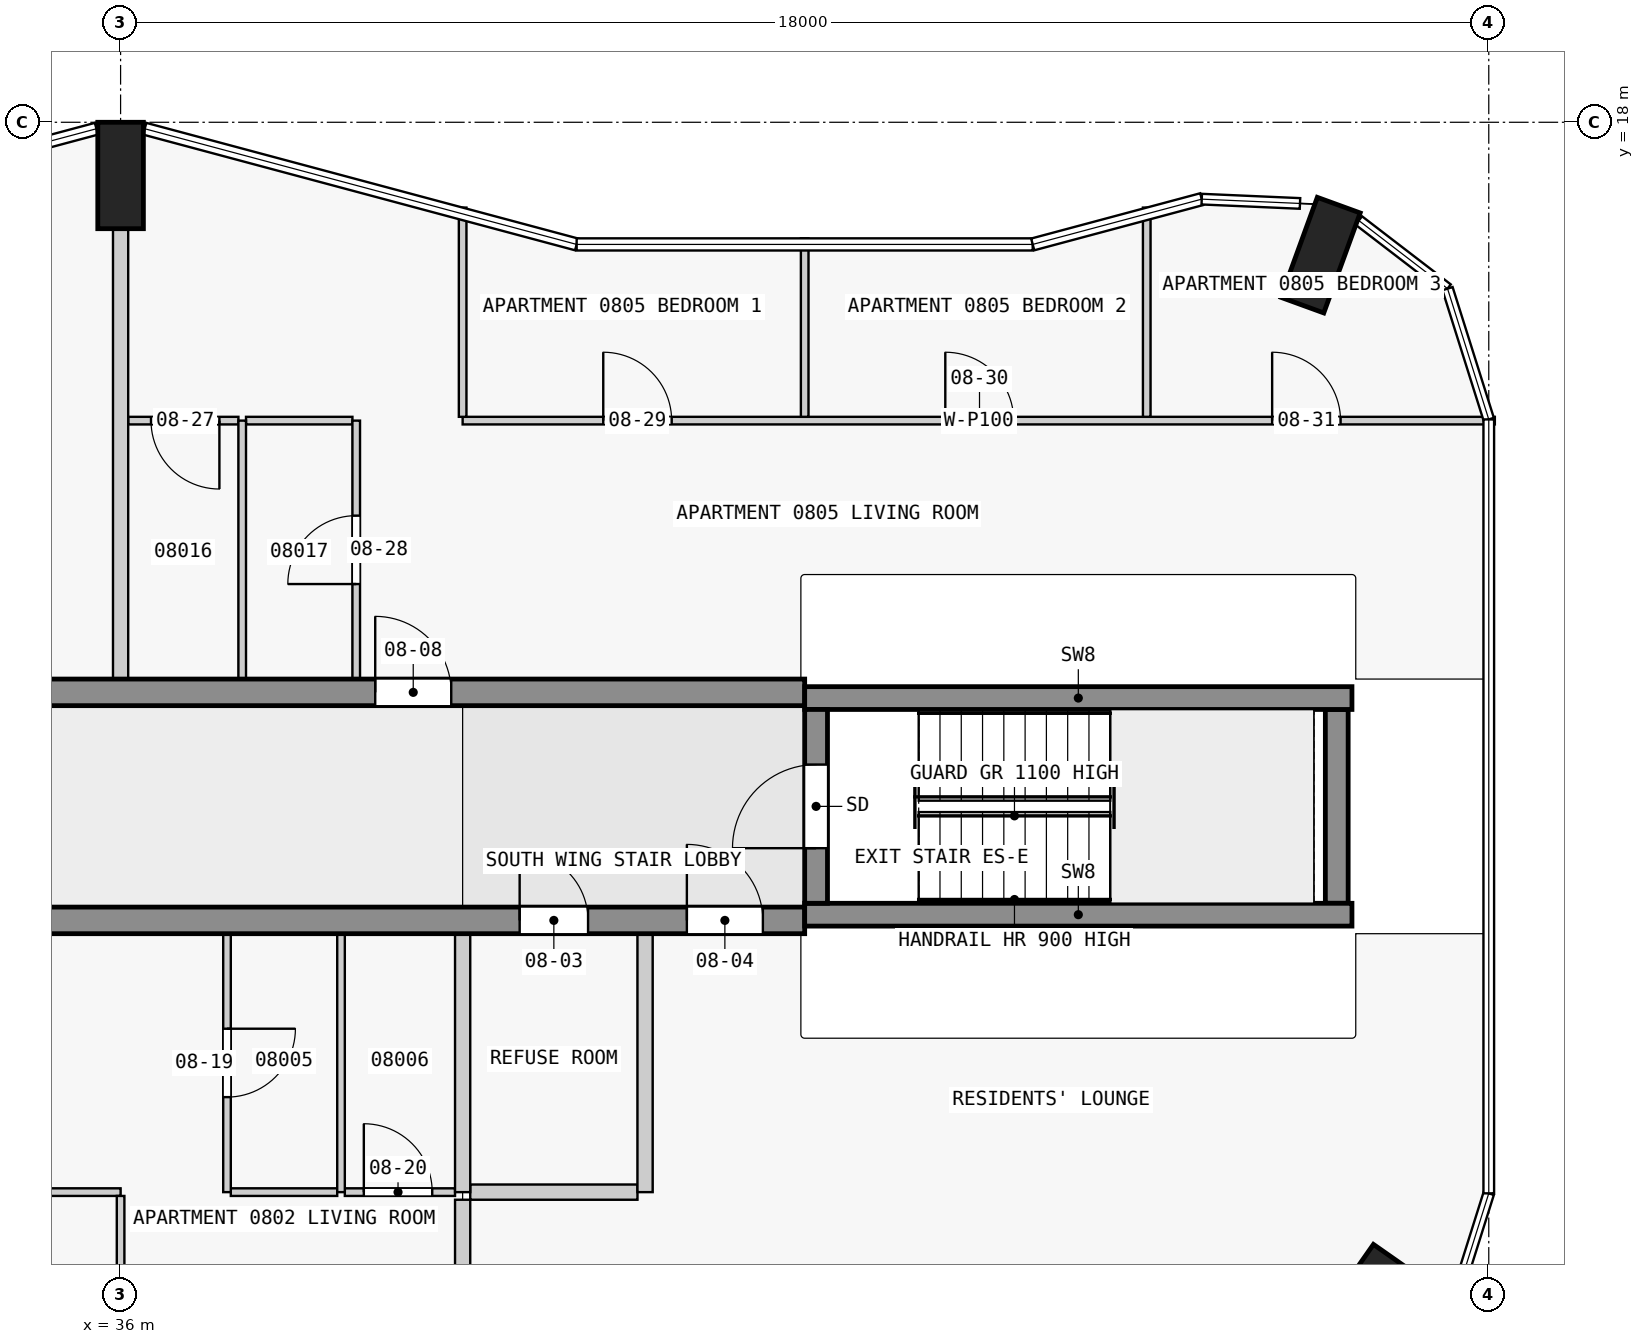
"""IFC4 building model, lengths in metres.
Left out: names, types, materials, properties, quantities, classifications, styles, units other than length and angle.
Written with IfcOpenShell. Run it as: python <this file> out.ifc"""

import sys

from ifc_helpers import new_model, si_unit, direction, frame, frame_2d, origin, origin_2d, place, context, subcontext, project, spatial, rectangle, extrude, element, fill, save


model = new_model("IFC4")
c1 = context("Model", 3, precision=1e-05, world=origin(), true_north=direction((0.0, 1.0)))
c2 = subcontext(c1, "Body", "Model", "MODEL_VIEW")
j1 = project(units=[si_unit("LENGTHUNIT", "METRE"), si_unit("PLANEANGLEUNIT", "RADIAN")], contexts=[c1])
p1 = place(None, origin())
s1 = spatial("IfcSite", under=j1, at=p1, CompositionType="ELEMENT")
p2 = place(p1, origin())
s2 = spatial("IfcBuilding", under=s1, at=p2, CompositionType="ELEMENT")
p3 = place(p2, frame((0.0, 0.0, 37.3)))
s3 = spatial("IfcBuildingStorey", under=s2, at=p3, CompositionType="ELEMENT", Elevation=37.3)
for number, where, z_axis, x_axis in (
    (1, (52.884, 2.59, 0.0), (0.0, 0.0, 1.0), (0.574, 0.819, 0.0)),
    (2, (51.787, 16.252, 0.0), (0.0, 0.0, 1.0), (-0.94, 0.342, 0.0)),
    (3, (36.0, 17.3, 0.0), (0.0, 0.0, 1.0), (1.0, 0.0, 0.0)),
):
    element("IfcColumn", number, at=place(p3, frame(where, z_axis=z_axis, x_axis=x_axis)), inside=s3, PredefinedType="COLUMN", context=c2, shape_type="SweptSolid", body=[
        extrude(rectangle(XDim=0.6, YDim=1.4, at=origin_2d()), origin(), (0.0, 0.0, 1.0), 3.5),
    ])
p4 = place(p3, frame((45.15, 7.725, 0.0), z_axis=(0.0, 0.0, 1.0), x_axis=(0.0, 1.0, 0.0)))
e4 = element("IfcWall", 4, at=p4, inside=s3, PredefinedType="SHEAR", context=c2, shape_type="SweptSolid", body=[
    extrude(rectangle(XDim=2.55, YDim=0.3, at=frame_2d((1.275, 0.0))), origin(), (0.0, 0.0, 1.0), 3.5),
])
p5 = place(p4, frame((0.725, 0.0, 0.0)))
e5 = element("IfcOpeningElement", 5, at=p5, cuts=e4, PredefinedType="OPENING", context=c2, shape_type="SweptSolid", body=[
    extrude(rectangle(XDim=1.1, YDim=2.1, at=frame_2d((0.55, 1.05))), frame((0.0, 0.16, 0.0), z_axis=(0.0, -1.0, 0.0), x_axis=(1.0, 0.0, 0.0)), (0.0, 0.0, 1.0), 0.32),
])
p6 = place(p3, frame((52.0, 7.725, 0.0), z_axis=(0.0, 0.0, 1.0), x_axis=(0.0, 1.0, 0.0)))
e6 = element("IfcWall", 6, at=p6, inside=s3, PredefinedType="SHEAR", context=c2, shape_type="SweptSolid", body=[
    extrude(rectangle(XDim=2.55, YDim=0.3, at=frame_2d((1.275, 0.0))), origin(), (0.0, 0.0, 1.0), 3.5),
])
for number, where, z_axis, x_axis in (
    (7, (45.0, 7.575, 0.0), (0.0, 0.0, 1.0), (1.0, 0.0, 0.0)),
    (8, (45.0, 10.425, 0.0), (0.0, 0.0, 1.0), (1.0, 0.0, 0.0)),
):
    element("IfcWall", number, at=place(p3, frame(where, z_axis=z_axis, x_axis=x_axis)), inside=s3, PredefinedType="SHEAR", context=c2, shape_type="SweptSolid", body=[
        extrude(rectangle(XDim=7.2, YDim=0.3, at=frame_2d((3.6, 0.0))), origin(), (0.0, 0.0, 1.0), 3.5),
    ])
p7 = place(p3, frame((22.5, 7.5, 0.0), z_axis=(0.0, 0.0, 1.0), x_axis=(1.0, 0.0, 0.0)))
e9 = element("IfcWall", 9, at=p7, inside=s3, PredefinedType="SHEAR", context=c2, shape_type="SweptSolid", body=[
    extrude(rectangle(XDim=22.5, YDim=0.35, at=frame_2d((11.25, 0.0))), origin(), (0.0, 0.0, 1.0), 3.25),
])
p8 = place(p7, frame((1.75, 0.0, 0.0)))
e10 = element("IfcOpeningElement", 10, at=p8, cuts=e9, PredefinedType="OPENING", context=c2, shape_type="SweptSolid", body=[
    extrude(rectangle(XDim=1.0, YDim=2.1, at=frame_2d((0.5, 1.05))), frame((0.0, 0.185, 0.0), z_axis=(0.0, -1.0, 0.0), x_axis=(1.0, 0.0, 0.0)), (0.0, 0.0, 1.0), 0.37),
])
p9 = place(p7, frame((9.25, 0.0, 0.0)))
e11 = element("IfcOpeningElement", 11, at=p9, cuts=e9, PredefinedType="OPENING", context=c2, shape_type="SweptSolid", body=[
    extrude(rectangle(XDim=1.0, YDim=2.1, at=frame_2d((0.5, 1.05))), frame((0.0, 0.185, 0.0), z_axis=(0.0, -1.0, 0.0), x_axis=(1.0, 0.0, 0.0)), (0.0, 0.0, 1.0), 0.37),
])
p10 = place(p7, frame((18.75, 0.0, 0.0)))
e12 = element("IfcOpeningElement", 12, at=p10, cuts=e9, PredefinedType="OPENING", context=c2, shape_type="SweptSolid", body=[
    extrude(rectangle(XDim=0.9, YDim=2.1, at=frame_2d((0.45, 1.05))), frame((0.0, 0.185, 0.0), z_axis=(0.0, -1.0, 0.0), x_axis=(1.0, 0.0, 0.0)), (0.0, 0.0, 1.0), 0.37),
])
p11 = place(p7, frame((20.95, 0.0, 0.0)))
e13 = element("IfcOpeningElement", 13, at=p11, cuts=e9, PredefinedType="OPENING", context=c2, shape_type="SweptSolid", body=[
    extrude(rectangle(XDim=1.0, YDim=2.1, at=frame_2d((0.5, 1.05))), frame((0.0, 0.185, 0.0), z_axis=(0.0, -1.0, 0.0), x_axis=(1.0, 0.0, 0.0)), (0.0, 0.0, 1.0), 0.37),
])
p12 = place(p3, frame((22.5, 10.5, 0.0), z_axis=(0.0, 0.0, 1.0), x_axis=(1.0, 0.0, 0.0)))
e14 = element("IfcWall", 14, at=p12, inside=s3, PredefinedType="SHEAR", context=c2, shape_type="SweptSolid", body=[
    extrude(rectangle(XDim=22.5, YDim=0.35, at=frame_2d((11.25, 0.0))), origin(), (0.0, 0.0, 1.0), 3.25),
])
p13 = place(p12, frame((1.75, 0.0, 0.0)))
e15 = element("IfcOpeningElement", 15, at=p13, cuts=e14, PredefinedType="OPENING", context=c2, shape_type="SweptSolid", body=[
    extrude(rectangle(XDim=1.0, YDim=2.1, at=frame_2d((0.5, 1.05))), frame((0.0, 0.185, 0.0), z_axis=(0.0, -1.0, 0.0), x_axis=(1.0, 0.0, 0.0)), (0.0, 0.0, 1.0), 0.37),
])
p14 = place(p12, frame((6.25, 0.0, 0.0)))
e16 = element("IfcOpeningElement", 16, at=p14, cuts=e14, PredefinedType="OPENING", context=c2, shape_type="SweptSolid", body=[
    extrude(rectangle(XDim=1.0, YDim=2.1, at=frame_2d((0.5, 1.05))), frame((0.0, 0.185, 0.0), z_axis=(0.0, -1.0, 0.0), x_axis=(1.0, 0.0, 0.0)), (0.0, 0.0, 1.0), 0.37),
])
p15 = place(p12, frame((10.75, 0.0, 0.0)))
e17 = element("IfcOpeningElement", 17, at=p15, cuts=e14, PredefinedType="OPENING", context=c2, shape_type="SweptSolid", body=[
    extrude(rectangle(XDim=1.0, YDim=2.1, at=frame_2d((0.5, 1.05))), frame((0.0, 0.185, 0.0), z_axis=(0.0, -1.0, 0.0), x_axis=(1.0, 0.0, 0.0)), (0.0, 0.0, 1.0), 0.37),
])
p16 = place(p12, frame((16.85, 0.0, 0.0)))
e18 = element("IfcOpeningElement", 18, at=p16, cuts=e14, PredefinedType="OPENING", context=c2, shape_type="SweptSolid", body=[
    extrude(rectangle(XDim=1.0, YDim=2.1, at=frame_2d((0.5, 1.05))), frame((0.0, 0.185, 0.0), z_axis=(0.0, -1.0, 0.0), x_axis=(1.0, 0.0, 0.0)), (0.0, 0.0, 1.0), 0.37),
])
p17 = place(p3, frame((36.0, 3.925, 0.0), z_axis=(0.0, 0.0, 1.0), x_axis=(-1.0, 0.0, 0.0)))
e19 = element("IfcWall", 19, at=p17, inside=s3, PredefinedType="PARTITIONING", context=c2, shape_type="SweptSolid", body=[
    extrude(rectangle(XDim=8.9, YDim=0.1, at=frame_2d((4.45, 0.0))), origin(), (0.0, 0.0, 1.0), 3.25),
])
p18 = place(p17, frame((6.25, 0.0, 0.0)))
e20 = element("IfcOpeningElement", 20, at=p18, cuts=e19, PredefinedType="OPENING", context=c2, shape_type="SweptSolid", body=[
    extrude(rectangle(XDim=0.9, YDim=2.1, at=frame_2d((0.45, 1.05))), frame((0.0, 0.06, 0.0), z_axis=(0.0, -1.0, 0.0), x_axis=(1.0, 0.0, 0.0)), (0.0, 0.0, 1.0), 0.12),
])
p19 = place(p17, frame((1.85, 0.0, 0.0)))
e21 = element("IfcOpeningElement", 21, at=p19, cuts=e19, PredefinedType="OPENING", context=c2, shape_type="SweptSolid", body=[
    extrude(rectangle(XDim=0.9, YDim=2.1, at=frame_2d((0.45, 1.05))), frame((0.0, 0.06, 0.0), z_axis=(0.0, -1.0, 0.0), x_axis=(1.0, 0.0, 0.0)), (0.0, 0.0, 1.0), 0.12),
])
p20 = place(p3, frame((37.45, 3.925, 0.0), z_axis=(0.0, 0.0, 1.0), x_axis=(1.0, 0.0, 0.0)))
e22 = element("IfcWall", 22, at=p20, inside=s3, PredefinedType="PARTITIONING", context=c2, shape_type="SweptSolid", body=[
    extrude(rectangle(XDim=1.4, YDim=0.1, at=frame_2d((0.7, 0.0))), origin(), (0.0, 0.0, 1.0), 3.25),
])
p21 = place(p3, frame((38.95, 3.925, 0.0), z_axis=(0.0, 0.0, 1.0), x_axis=(1.0, 0.0, 0.0)))
e23 = element("IfcWall", 23, at=p21, inside=s3, PredefinedType="PARTITIONING", context=c2, shape_type="SweptSolid", body=[
    extrude(rectangle(XDim=1.45, YDim=0.1, at=frame_2d((0.725, 0.0))), origin(), (0.0, 0.0, 1.0), 3.25),
])
p22 = place(p21, frame((0.25, 0.0, 0.0)))
e24 = element("IfcOpeningElement", 24, at=p22, cuts=e23, PredefinedType="OPENING", context=c2, shape_type="SweptSolid", body=[
    extrude(rectangle(XDim=0.9, YDim=2.1, at=frame_2d((0.45, 1.05))), frame((0.0, 0.06, 0.0), z_axis=(0.0, -1.0, 0.0), x_axis=(1.0, 0.0, 0.0)), (0.0, 0.0, 1.0), 0.12),
])
p23 = place(p3, frame((40.6, 3.925, 0.0), z_axis=(0.0, 0.0, 1.0), x_axis=(1.0, 0.0, 0.0)))
e25 = element("IfcWall", 25, at=p23, inside=s3, PredefinedType="PARTITIONING", context=c2, shape_type="SweptSolid", body=[
    extrude(rectangle(XDim=2.2, YDim=0.2, at=frame_2d((1.1, 0.0))), origin(), (0.0, 0.0, 1.0), 3.25),
])
p24 = place(p3, frame((37.55, 14.075, 0.0), z_axis=(0.0, 0.0, 1.0), x_axis=(-1.0, 0.0, 0.0)))
e26 = element("IfcWall", 26, at=p24, inside=s3, PredefinedType="PARTITIONING", context=c2, shape_type="SweptSolid", body=[
    extrude(rectangle(XDim=1.45, YDim=0.1, at=frame_2d((0.725, 0.0))), origin(), (0.0, 0.0, 1.0), 3.25),
])
p25 = place(p24, frame((0.25, 0.0, 0.0)))
e27 = element("IfcOpeningElement", 27, at=p25, cuts=e26, PredefinedType="OPENING", context=c2, shape_type="SweptSolid", body=[
    extrude(rectangle(XDim=0.9, YDim=2.1, at=frame_2d((0.45, 1.05))), frame((0.0, 0.06, 0.0), z_axis=(0.0, -1.0, 0.0), x_axis=(1.0, 0.0, 0.0)), (0.0, 0.0, 1.0), 0.12),
])
p26 = place(p3, frame((39.05, 14.075, 0.0), z_axis=(0.0, 0.0, 1.0), x_axis=(-1.0, 0.0, 0.0)))
e28 = element("IfcWall", 28, at=p26, inside=s3, PredefinedType="PARTITIONING", context=c2, shape_type="SweptSolid", body=[
    extrude(rectangle(XDim=1.4, YDim=0.1, at=frame_2d((0.7, 0.0))), origin(), (0.0, 0.0, 1.0), 3.25),
])
p27 = place(p3, frame((40.5, 14.075, 0.0), z_axis=(0.0, 0.0, 1.0), x_axis=(1.0, 0.0, 0.0)))
e29 = element("IfcWall", 29, at=p27, inside=s3, PredefinedType="PARTITIONING", context=c2, shape_type="SweptSolid", body=[
    extrude(rectangle(XDim=13.58, YDim=0.1, at=frame_2d((6.79, 0.0))), origin(), (0.0, 0.0, 1.0), 3.25),
])
p28 = place(p27, frame((1.85, 0.0, 0.0)))
e30 = element("IfcOpeningElement", 30, at=p28, cuts=e29, PredefinedType="OPENING", context=c2, shape_type="SweptSolid", body=[
    extrude(rectangle(XDim=0.9, YDim=2.1, at=frame_2d((0.45, 1.05))), frame((0.0, 0.06, 0.0), z_axis=(0.0, -1.0, 0.0), x_axis=(1.0, 0.0, 0.0)), (0.0, 0.0, 1.0), 0.12),
])
p29 = place(p27, frame((6.35, 0.0, 0.0)))
e31 = element("IfcOpeningElement", 31, at=p29, cuts=e29, PredefinedType="OPENING", context=c2, shape_type="SweptSolid", body=[
    extrude(rectangle(XDim=0.9, YDim=2.1, at=frame_2d((0.45, 1.05))), frame((0.0, 0.06, 0.0), z_axis=(0.0, -1.0, 0.0), x_axis=(1.0, 0.0, 0.0)), (0.0, 0.0, 1.0), 0.12),
])
p30 = place(p27, frame((10.65, 0.0, 0.0)))
e32 = element("IfcOpeningElement", 32, at=p30, cuts=e29, PredefinedType="OPENING", context=c2, shape_type="SweptSolid", body=[
    extrude(rectangle(XDim=0.9, YDim=2.1, at=frame_2d((0.45, 1.05))), frame((0.0, 0.06, 0.0), z_axis=(0.0, -1.0, 0.0), x_axis=(1.0, 0.0, 0.0)), (0.0, 0.0, 1.0), 0.12),
])
p31 = place(p3, frame((36.0, 1.4, 0.0), z_axis=(0.0, 0.0, 1.0), x_axis=(0.0, 1.0, 0.0)))
e33 = element("IfcWall", 33, at=p31, inside=s3, PredefinedType="PARTITIONING", context=c2, shape_type="SweptSolid", body=[
    extrude(rectangle(XDim=2.475, YDim=0.1, at=frame_2d((1.238, 0.0))), origin(), (0.0, 0.0, 1.0), 3.25),
])
p32 = place(p3, frame((36.0, 10.675, 0.0), z_axis=(0.0, 0.0, 1.0), x_axis=(0.0, 1.0, 0.0)))
e34 = element("IfcWall", 34, at=p32, inside=s3, PredefinedType="PARTITIONING", context=c2, shape_type="SweptSolid", body=[
    extrude(rectangle(XDim=5.925, YDim=0.2, at=frame_2d((2.962, 0.0))), origin(), (0.0, 0.0, 1.0), 3.25),
])
p33 = place(p3, frame((37.4, 7.325, 0.0), z_axis=(0.0, 0.0, 1.0), x_axis=(0.0, -1.0, 0.0)))
e35 = element("IfcWall", 35, at=p33, inside=s3, PredefinedType="PARTITIONING", context=c2, shape_type="SweptSolid", body=[
    extrude(rectangle(XDim=3.4, YDim=0.1, at=frame_2d((1.7, 0.0))), origin(), (0.0, 0.0, 1.0), 3.25),
])
p34 = place(p33, frame((1.25, 0.0, 0.0)))
e36 = element("IfcOpeningElement", 36, at=p34, cuts=e35, PredefinedType="OPENING", context=c2, shape_type="SweptSolid", body=[
    extrude(rectangle(XDim=0.9, YDim=2.1, at=frame_2d((0.45, 1.05))), frame((0.0, 0.06, 0.0), z_axis=(0.0, -1.0, 0.0), x_axis=(1.0, 0.0, 0.0)), (0.0, 0.0, 1.0), 0.12),
])
for number, where, z_axis, x_axis in (
    (37, (37.6, 10.675, 0.0), (0.0, 0.0, 1.0), (0.0, 1.0, 0.0)),
    (38, (38.9, 3.925, 0.0), (0.0, 0.0, 1.0), (0.0, 1.0, 0.0)),
):
    element("IfcWall", number, at=place(p3, frame(where, z_axis=z_axis, x_axis=x_axis)), inside=s3, PredefinedType="PARTITIONING", context=c2, shape_type="SweptSolid", body=[
        extrude(rectangle(XDim=3.4, YDim=0.1, at=frame_2d((1.7, 0.0))), origin(), (0.0, 0.0, 1.0), 3.25),
    ])
p35 = place(p3, frame((39.1, 10.675, 0.0), z_axis=(0.0, 0.0, 1.0), x_axis=(0.0, 1.0, 0.0)))
e39 = element("IfcWall", 39, at=p35, inside=s3, PredefinedType="PARTITIONING", context=c2, shape_type="SweptSolid", body=[
    extrude(rectangle(XDim=3.4, YDim=0.1, at=frame_2d((1.7, 0.0))), origin(), (0.0, 0.0, 1.0), 3.25),
])
p36 = place(p35, frame((1.25, 0.0, 0.0)))
e40 = element("IfcOpeningElement", 40, at=p36, cuts=e39, PredefinedType="OPENING", context=c2, shape_type="SweptSolid", body=[
    extrude(rectangle(XDim=0.9, YDim=2.1, at=frame_2d((0.45, 1.05))), frame((0.0, 0.06, 0.0), z_axis=(0.0, -1.0, 0.0), x_axis=(1.0, 0.0, 0.0)), (0.0, 0.0, 1.0), 0.12),
])
p37 = place(p3, frame((40.5, 16.878, 0.0), z_axis=(0.0, 0.0, 1.0), x_axis=(0.0, -1.0, 0.0)))
e41 = element("IfcWall", 41, at=p37, inside=s3, PredefinedType="PARTITIONING", context=c2, shape_type="SweptSolid", body=[
    extrude(rectangle(XDim=2.753, YDim=0.1, at=frame_2d((1.376, 0.0))), origin(), (0.0, 0.0, 1.0), 3.25),
])
p38 = place(p3, frame((40.5, 3.825, 0.0), z_axis=(0.0, 0.0, 1.0), x_axis=(0.0, -1.0, 0.0)))
e42 = element("IfcWall", 42, at=p38, inside=s3, PredefinedType="PARTITIONING", context=c2, shape_type="SweptSolid", body=[
    extrude(rectangle(XDim=2.703, YDim=0.2, at=frame_2d((1.351, 0.0))), origin(), (0.0, 0.0, 1.0), 3.25),
])
for number, where, z_axis, x_axis in (
    (43, (40.5, 3.925, 0.0), (0.0, 0.0, 1.0), (0.0, 1.0, 0.0)),
    (44, (42.9, 3.925, 0.0), (0.0, 0.0, 1.0), (0.0, 1.0, 0.0)),
):
    element("IfcWall", number, at=place(p3, frame(where, z_axis=z_axis, x_axis=x_axis)), inside=s3, PredefinedType="PARTITIONING", context=c2, shape_type="SweptSolid", body=[
        extrude(rectangle(XDim=3.4, YDim=0.2, at=frame_2d((1.7, 0.0))), origin(), (0.0, 0.0, 1.0), 3.25),
    ])
p39 = place(p3, frame((45.0, 14.125, 0.0), z_axis=(0.0, 0.0, 1.0), x_axis=(0.0, 1.0, 0.0)))
e45 = element("IfcWall", 45, at=p39, inside=s3, PredefinedType="PARTITIONING", context=c2, shape_type="SweptSolid", body=[
    extrude(rectangle(XDim=2.348, YDim=0.1, at=frame_2d((1.174, 0.0))), origin(), (0.0, 0.0, 1.0), 3.25),
])
p40 = place(p3, frame((49.5, 14.125, 0.0), z_axis=(0.0, 0.0, 1.0), x_axis=(0.0, 1.0, 0.0)))
e46 = element("IfcWall", 46, at=p40, inside=s3, PredefinedType="PARTITIONING", context=c2, shape_type="SweptSolid", body=[
    extrude(rectangle(XDim=2.753, YDim=0.1, at=frame_2d((1.376, 0.0))), origin(), (0.0, 0.0, 1.0), 3.25),
])
p41 = place(p5, origin())
e47 = element("IfcDoor", 47, at=p41, inside=s3, OperationType="SINGLE_SWING_LEFT", PredefinedType="DOOR", context=c2, shape_type="SweptSolid", body=[
    extrude(rectangle(XDim=1.1, YDim=2.1, at=frame_2d((0.55, 1.05))), frame((0.0, 0.025, 0.0), z_axis=(0.0, -1.0, 0.0), x_axis=(1.0, 0.0, 0.0)), (0.0, 0.0, 1.0), 0.05),
])
fill(e5, e47)
p42 = place(p10, origin())
e48 = element("IfcDoor", 48, at=p42, inside=s3, OperationType="SINGLE_SWING_RIGHT", PredefinedType="DOOR", context=c2, shape_type="SweptSolid", body=[
    extrude(rectangle(XDim=0.9, YDim=2.1, at=frame_2d((0.45, 1.05))), frame((0.0, 0.025, 0.0), z_axis=(0.0, -1.0, 0.0), x_axis=(1.0, 0.0, 0.0)), (0.0, 0.0, 1.0), 0.05),
])
fill(e12, e48)
p43 = place(p11, origin())
e49 = element("IfcDoor", 49, at=p43, inside=s3, OperationType="SINGLE_SWING_RIGHT", PredefinedType="DOOR", context=c2, shape_type="SweptSolid", body=[
    extrude(rectangle(XDim=1.0, YDim=2.1, at=frame_2d((0.5, 1.05))), frame((0.0, 0.025, 0.0), z_axis=(0.0, -1.0, 0.0), x_axis=(1.0, 0.0, 0.0)), (0.0, 0.0, 1.0), 0.05),
])
fill(e13, e49)
p44 = place(p16, origin())
e50 = element("IfcDoor", 50, at=p44, inside=s3, OperationType="SINGLE_SWING_RIGHT", PredefinedType="DOOR", context=c2, shape_type="SweptSolid", body=[
    extrude(rectangle(XDim=1.0, YDim=2.1, at=frame_2d((0.5, 1.05))), frame((0.0, 0.025, 0.0), z_axis=(0.0, -1.0, 0.0), x_axis=(1.0, 0.0, 0.0)), (0.0, 0.0, 1.0), 0.05),
])
fill(e18, e50)
p45 = place(p34, origin())
e51 = element("IfcDoor", 51, at=p45, inside=s3, OperationType="SINGLE_SWING_LEFT", PredefinedType="DOOR", context=c2, shape_type="SweptSolid", body=[
    extrude(rectangle(XDim=0.9, YDim=2.1, at=frame_2d((0.45, 1.05))), frame((0.0, 0.025, 0.0), z_axis=(0.0, -1.0, 0.0), x_axis=(1.0, 0.0, 0.0)), (0.0, 0.0, 1.0), 0.05),
])
fill(e36, e51)
p46 = place(p22, origin())
e52 = element("IfcDoor", 52, at=p46, inside=s3, OperationType="SINGLE_SWING_LEFT", PredefinedType="DOOR", context=c2, shape_type="SweptSolid", body=[
    extrude(rectangle(XDim=0.9, YDim=2.1, at=frame_2d((0.45, 1.05))), frame((0.0, 0.025, 0.0), z_axis=(0.0, -1.0, 0.0), x_axis=(1.0, 0.0, 0.0)), (0.0, 0.0, 1.0), 0.05),
])
fill(e24, e52)
p47 = place(p25, origin())
e53 = element("IfcDoor", 53, at=p47, inside=s3, OperationType="SINGLE_SWING_LEFT", PredefinedType="DOOR", context=c2, shape_type="SweptSolid", body=[
    extrude(rectangle(XDim=0.9, YDim=2.1, at=frame_2d((0.45, 1.05))), frame((0.0, 0.025, 0.0), z_axis=(0.0, -1.0, 0.0), x_axis=(1.0, 0.0, 0.0)), (0.0, 0.0, 1.0), 0.05),
])
fill(e27, e53)
p48 = place(p36, origin())
e54 = element("IfcDoor", 54, at=p48, inside=s3, OperationType="SINGLE_SWING_RIGHT", PredefinedType="DOOR", context=c2, shape_type="SweptSolid", body=[
    extrude(rectangle(XDim=0.9, YDim=2.1, at=frame_2d((0.45, 1.05))), frame((0.0, 0.025, 0.0), z_axis=(0.0, -1.0, 0.0), x_axis=(1.0, 0.0, 0.0)), (0.0, 0.0, 1.0), 0.05),
])
fill(e40, e54)
p49 = place(p28, origin())
e55 = element("IfcDoor", 55, at=p49, inside=s3, OperationType="SINGLE_SWING_LEFT", PredefinedType="DOOR", context=c2, shape_type="SweptSolid", body=[
    extrude(rectangle(XDim=0.9, YDim=2.1, at=frame_2d((0.45, 1.05))), frame((0.0, 0.025, 0.0), z_axis=(0.0, -1.0, 0.0), x_axis=(1.0, 0.0, 0.0)), (0.0, 0.0, 1.0), 0.05),
])
fill(e30, e55)
p50 = place(p29, origin())
e56 = element("IfcDoor", 56, at=p50, inside=s3, OperationType="SINGLE_SWING_RIGHT", PredefinedType="DOOR", context=c2, shape_type="SweptSolid", body=[
    extrude(rectangle(XDim=0.9, YDim=2.1, at=frame_2d((0.45, 1.05))), frame((0.0, 0.025, 0.0), z_axis=(0.0, -1.0, 0.0), x_axis=(1.0, 0.0, 0.0)), (0.0, 0.0, 1.0), 0.05),
])
fill(e31, e56)
p51 = place(p30, origin())
e57 = element("IfcDoor", 57, at=p51, inside=s3, OperationType="SINGLE_SWING_RIGHT", PredefinedType="DOOR", context=c2, shape_type="SweptSolid", body=[
    extrude(rectangle(XDim=0.9, YDim=2.1, at=frame_2d((0.45, 1.05))), frame((0.0, 0.025, 0.0), z_axis=(0.0, -1.0, 0.0), x_axis=(1.0, 0.0, 0.0)), (0.0, 0.0, 1.0), 0.05),
])
fill(e32, e57)
save(model, sys.argv[1])
